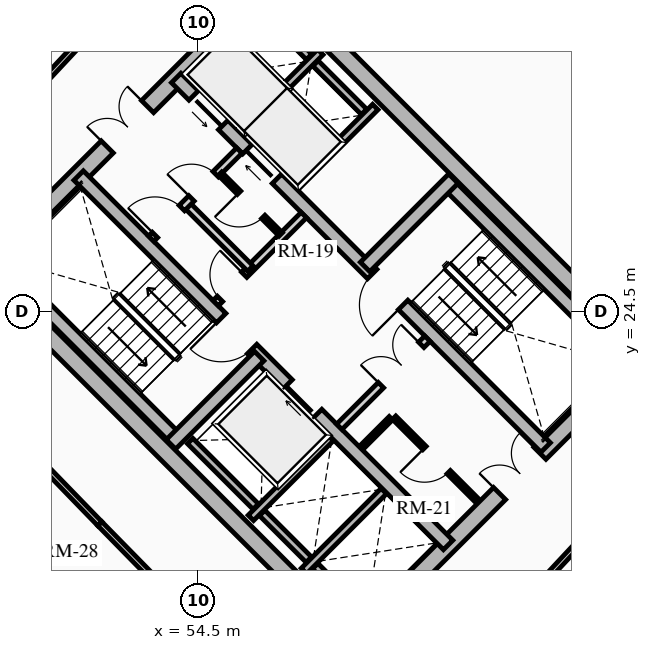
"""IFC4 building model, lengths in metres.
Left out: names, types, materials, properties, quantities, classifications, styles, units other than length and angle.
Written with IfcOpenShell. Run it as: python <this file> out.ifc"""

import sys

from ifc_helpers import new_model, si_unit, direction, frame, frame_2d, origin, place, context, subcontext, project, spatial, rectangle, extrude, source, transform, mapped, element, fill, save


model = new_model("IFC4")
c1 = context("Model", 3, precision=1e-05, world=origin(), true_north=direction((0.0, 1.0)))
c2 = subcontext(c1, "Body", "Model", "MODEL_VIEW")
j1 = project(units=[si_unit("LENGTHUNIT", "METRE"), si_unit("PLANEANGLEUNIT", "RADIAN")], contexts=[c1])
p1 = place(None, origin())
s1 = spatial("IfcSite", under=j1, at=p1, CompositionType="ELEMENT")
p2 = place(p1, origin())
s2 = spatial("IfcBuilding", under=s1, at=p2, CompositionType="ELEMENT")
p3 = place(p2, frame((0.0, 0.0, 119.62)))
s3 = spatial("IfcBuildingStorey", under=s2, at=p3, CompositionType="ELEMENT", Elevation=119.62)
for number, where, z_axis, x_axis in (
    (1, (58.737, 15.697, 0.0), (0.0, 0.0, 1.0), (-0.707, 0.707, 0.0)),
    (2, (66.303, 23.263, 0.0), (0.0, 0.0, 1.0), (-0.707, 0.707, 0.0)),
):
    element("IfcWall", number, at=place(p3, frame(where, z_axis=z_axis, x_axis=x_axis)), inside=s3, PredefinedType="SHEAR", context=c2, shape_type="SweptSolid", body=[
        extrude(rectangle(XDim=14.2, YDim=0.45, at=frame_2d((7.1, 0.0))), origin(), (0.0, 0.0, 1.0), 2.91),
    ])
p4 = place(p3, frame((58.578, 15.856, 0.0), z_axis=(0.0, 0.0, 1.0), x_axis=(0.707106781187, 0.707106781187, 0.0)))
e3 = element("IfcWall", 3, at=p4, inside=s3, PredefinedType="SHEAR", context=c2, shape_type="SweptSolid", body=[
    extrude(rectangle(XDim=10.7, YDim=0.45, at=frame_2d((5.35, 0.0))), origin(), (0.0, 0.0, 1.0), 2.91),
])
m1 = source(origin(), c2, "Body", "SweptSolid", [
    extrude(rectangle(XDim=1.5, YDim=2.02, at=frame_2d((0.75, 1.01))), frame((0.0, 0.235, 0.0), z_axis=(0.0, -1.0, 0.0), x_axis=(1.0, 0.0, 0.0)), (0.0, 0.0, 1.0), 0.47),
])
p5 = place(p4, frame((5.45, 0.0, 0.0)))
e4 = element("IfcOpeningElement", 4, at=p5, cuts=e3, PredefinedType="OPENING", context=c2, shape_type="MappedRepresentation", body=[
    mapped(m1, transform((0.0, 0.0, 0.0), x_axis=(1.0, 0.0, 0.0), y_axis=(0.0, 1.0, 0.0), z_axis=(0.0, 0.0, 1.0), scale=1.0)),
])
p6 = place(p3, frame((48.856, 25.578, 0.0), z_axis=(0.0, 0.0, 1.0), x_axis=(0.707106781187, 0.707106781187, 0.0)))
e5 = element("IfcWall", 5, at=p6, inside=s3, PredefinedType="SHEAR", context=c2, shape_type="SweptSolid", body=[
    extrude(rectangle(XDim=10.7, YDim=0.45, at=frame_2d((5.35, 0.0))), origin(), (0.0, 0.0, 1.0), 2.91),
])
p7 = place(p6, frame((4.6, 0.0, 0.0)))
e6 = element("IfcOpeningElement", 6, at=p7, cuts=e5, PredefinedType="OPENING", context=c2, shape_type="MappedRepresentation", body=[
    mapped(m1, transform((0.0, 0.0, 0.0), x_axis=(1.0, 0.0, 0.0), y_axis=(0.0, 1.0, 0.0), z_axis=(0.0, 0.0, 1.0), scale=1.0)),
])
p8 = place(p3, frame((61.078, 18.355, 0.0), z_axis=(0.0, 0.0, 1.0), x_axis=(-0.707106781187, 0.707106781187, 0.0)))
e7 = element("IfcWall", 7, at=p8, inside=s3, PredefinedType="SHEAR", context=c2, shape_type="SweptSolid", body=[
    extrude(rectangle(XDim=13.75, YDim=0.35, at=frame_2d((6.875, 0.0))), origin(), (0.0, 0.0, 1.0), 2.91),
])
m2 = source(origin(), c2, "Body", "SweptSolid", [
    extrude(rectangle(XDim=1.1, YDim=2.015, at=frame_2d((0.55, 1.007))), frame((0.0, 0.185, 0.0), z_axis=(0.0, -1.0, 0.0), x_axis=(1.0, 0.0, 0.0)), (0.0, 0.0, 1.0), 0.37),
])
p9 = place(p8, frame((4.875, 0.0, 0.0)))
e8 = element("IfcOpeningElement", 8, at=p9, cuts=e7, PredefinedType="OPENING", context=c2, shape_type="MappedRepresentation", body=[
    mapped(m2, transform((0.0, 0.0, 0.0), x_axis=(1.0, 0.0, 0.0), y_axis=(0.0, 1.0, 0.0), z_axis=(0.0, 0.0, 1.0), scale=1.0)),
])
m3 = source(origin(), c2, "Body", "SweptSolid", [
    extrude(rectangle(XDim=1.15, YDim=2.02, at=frame_2d((0.575, 1.01))), frame((0.0, 0.185, 0.0), z_axis=(0.0, -1.0, 0.0), x_axis=(1.0, 0.0, 0.0)), (0.0, 0.0, 1.0), 0.37),
])
p10 = place(p8, frame((7.295, 0.0, 0.0)))
e9 = element("IfcOpeningElement", 9, at=p10, cuts=e7, PredefinedType="OPENING", context=c2, shape_type="MappedRepresentation", body=[
    mapped(m3, transform((0.0, 0.0, 0.0), x_axis=(1.0, 0.0, 0.0), y_axis=(0.0, 1.0, 0.0), z_axis=(0.0, 0.0, 1.0), scale=1.0)),
])
p11 = place(p3, frame((63.645, 20.922, 0.0), z_axis=(0.0, 0.0, 1.0), x_axis=(-0.707106781187, 0.707106781187, 0.0)))
e10 = element("IfcWall", 10, at=p11, inside=s3, PredefinedType="SHEAR", context=c2, shape_type="SweptSolid", body=[
    extrude(rectangle(XDim=13.75, YDim=0.35, at=frame_2d((6.875, 0.0))), origin(), (0.0, 0.0, 1.0), 2.91),
])
p12 = place(p11, frame((10.0, 0.0, 0.0)))
e11 = element("IfcOpeningElement", 11, at=p12, cuts=e10, PredefinedType="OPENING", context=c2, shape_type="MappedRepresentation", body=[
    mapped(m2, transform((0.0, 0.0, 0.0), x_axis=(1.0, 0.0, 0.0), y_axis=(0.0, 1.0, 0.0), z_axis=(0.0, 0.0, 1.0), scale=1.0)),
])
p13 = place(p11, frame((12.0, 0.0, 0.0)))
e12 = element("IfcOpeningElement", 12, at=p13, cuts=e10, PredefinedType="OPENING", context=c2, shape_type="MappedRepresentation", body=[
    mapped(m2, transform((0.0, 0.0, 0.0), x_axis=(1.0, 0.0, 0.0), y_axis=(0.0, 1.0, 0.0), z_axis=(0.0, 0.0, 1.0), scale=1.0)),
])
p14 = place(p11, frame((5.305, 0.0, 0.0)))
e13 = element("IfcOpeningElement", 13, at=p14, cuts=e10, PredefinedType="OPENING", context=c2, shape_type="MappedRepresentation", body=[
    mapped(m3, transform((0.0, 0.0, 0.0), x_axis=(1.0, 0.0, 0.0), y_axis=(0.0, 1.0, 0.0), z_axis=(0.0, 0.0, 1.0), scale=1.0)),
])
p15 = place(p3, frame((53.922, 21.141, 0.0), z_axis=(0.0, 0.0, 1.0), x_axis=(-0.707088616009, 0.707124945897, 0.0)))
e14 = element("IfcWall", 14, at=p15, inside=s3, PredefinedType="SHEAR", context=c2, shape_type="SweptSolid", body=[
    extrude(rectangle(XDim=6.72, YDim=0.35, at=frame_2d((3.36, 0.0))), origin(), (0.0, 0.0, 1.0), 2.91),
])
p16 = place(p3, frame((53.784, 21.003, 0.0), z_axis=(0.0, 0.0, 1.0), x_axis=(0.707106781187, 0.707106781187, 0.0)))
e15 = element("IfcWall", 15, at=p16, inside=s3, PredefinedType="SHEAR", context=c2, shape_type="SweptSolid", body=[
    extrude(rectangle(XDim=3.285, YDim=0.35, at=frame_2d((1.643, 0.0))), origin(), (0.0, 0.0, 1.0), 2.91),
])
p17 = place(p3, frame((65.83, 23.107, 0.0), z_axis=(0.0, 0.0, 1.0), x_axis=(-0.707088616009, 0.707124945897, 0.0)))
e16 = element("IfcWall", 16, at=p17, inside=s3, PredefinedType="SHEAR", context=c2, shape_type="SweptSolid", body=[
    extrude(rectangle(XDim=6.72, YDim=0.35, at=frame_2d((3.36, 0.0))), origin(), (0.0, 0.0, 1.0), 2.91),
])
p18 = place(p3, frame((58.893, 25.674, 0.0), z_axis=(0.0, 0.0, 1.0), x_axis=(0.707106781187, 0.707106781187, 0.0)))
e17 = element("IfcWall", 17, at=p18, inside=s3, PredefinedType="SHEAR", context=c2, shape_type="SweptSolid", body=[
    extrude(rectangle(XDim=3.285, YDim=0.35, at=frame_2d((1.643, 0.0))), origin(), (0.0, 0.0, 1.0), 2.91),
])
p19 = place(p3, frame((55.888, 19.069, 0.0), z_axis=(0.0, 0.0, 1.0), x_axis=(0.707106781187, 0.707106781187, 0.0)))
e18 = element("IfcWall", 18, at=p19, inside=s3, PredefinedType="SHEAR", context=c2, shape_type="SweptSolid", body=[
    extrude(rectangle(XDim=2.97, YDim=0.2, at=frame_2d((1.485, 0.0))), origin(), (0.0, 0.0, 1.0), 2.91),
])
p20 = place(p3, frame((56.015, 19.366, 0.0), z_axis=(0.0, 0.0, 1.0), x_axis=(-0.707106781187, 0.707106781187, 0.0)))
e19 = element("IfcWall", 19, at=p20, inside=s3, PredefinedType="SHEAR", context=c2, shape_type="SweptSolid", body=[
    extrude(rectangle(XDim=2.44, YDim=0.2, at=frame_2d((1.22, 0.0))), origin(), (0.0, 0.0, 1.0), 2.91),
])
p21 = place(p3, frame((57.284, 17.673, 0.0), z_axis=(0.0, 0.0, 1.0), x_axis=(0.707147878904, 0.70706568108, 0.0)))
e20 = element("IfcWall", 20, at=p21, inside=s3, PredefinedType="SHEAR", context=c2, shape_type="SweptSolid", body=[
    extrude(rectangle(XDim=2.97, YDim=0.2, at=frame_2d((1.485, 0.0))), origin(), (0.0, 0.0, 1.0), 2.91),
])
p22 = place(p3, frame((57.412, 17.97, 0.0), z_axis=(0.0, 0.0, 1.0), x_axis=(-0.707106781187, 0.707106781187, 0.0)))
e21 = element("IfcWall", 21, at=p22, inside=s3, PredefinedType="SHEAR", context=c2, shape_type="SweptSolid", body=[
    extrude(rectangle(XDim=1.735, YDim=0.2, at=frame_2d((0.867, 0.0))), origin(), (0.0, 0.0, 1.0), 2.91),
])
p23 = place(p3, frame((58.737, 16.644, 0.0), z_axis=(0.0, 0.0, 1.0), x_axis=(-0.707032117043, 0.707181437447, 0.0)))
e22 = element("IfcWall", 22, at=p23, inside=s3, PredefinedType="SHEAR", context=c2, shape_type="SweptSolid", body=[
    extrude(rectangle(XDim=1.635, YDim=0.2, at=frame_2d((0.817, 0.0))), origin(), (0.0, 0.0, 1.0), 2.91),
])
p24 = place(p3, frame((57.062, 27.781, 0.0), z_axis=(0.0, 0.0, 1.0), x_axis=(0.707106781187, 0.707106781187, 0.0)))
e23 = element("IfcWall", 23, at=p24, inside=s3, PredefinedType="SHEAR", context=c2, shape_type="SweptSolid", body=[
    extrude(rectangle(XDim=2.97, YDim=0.2, at=frame_2d((1.485, 0.0))), origin(), (0.0, 0.0, 1.0), 2.91),
])
p25 = place(p3, frame((55.615, 29.227, 0.0), z_axis=(0.0, 0.0, 1.0), x_axis=(0.707147878904, 0.70706568108, 0.0)))
e24 = element("IfcWall", 24, at=p25, inside=s3, PredefinedType="SHEAR", context=c2, shape_type="SweptSolid", body=[
    extrude(rectangle(XDim=2.97, YDim=0.2, at=frame_2d((1.485, 0.0))), origin(), (0.0, 0.0, 1.0), 2.91),
])
p26 = place(p3, frame((58.865, 29.754, 0.0), z_axis=(0.0, 0.0, 1.0), x_axis=(-0.707174411312, 0.707039144592, 0.0)))
e25 = element("IfcWall", 25, at=p26, inside=s3, PredefinedType="SHEAR", context=c2, shape_type="SweptSolid", body=[
    extrude(rectangle(XDim=1.805, YDim=0.2, at=frame_2d((0.902, 0.0))), origin(), (0.0, 0.0, 1.0), 2.91),
])
p27 = place(p3, frame((57.419, 31.2, 0.0), z_axis=(0.0, 0.0, 1.0), x_axis=(-0.707032117043, 0.707181437447, 0.0)))
e26 = element("IfcWall", 26, at=p27, inside=s3, PredefinedType="SHEAR", context=c2, shape_type="SweptSolid", body=[
    extrude(rectangle(XDim=1.635, YDim=0.2, at=frame_2d((0.817, 0.0))), origin(), (0.0, 0.0, 1.0), 2.91),
])
p28 = place(p3, frame((58.214, 21.467, 0.0), z_axis=(0.0, 0.0, 1.0), x_axis=(0.707106781187, 0.707106781187, 0.0)))
e27 = element("IfcWall", 27, at=p28, inside=s3, PredefinedType="PARTITIONING", context=c2, shape_type="SweptSolid", body=[
    extrude(rectangle(XDim=3.28, YDim=0.2, at=frame_2d((1.64, 0.0))), origin(), (0.0, 0.0, 1.0), 2.655),
])
m4 = source(origin(), c2, "Body", "SweptSolid", [
    extrude(rectangle(XDim=1.5, YDim=2.02, at=frame_2d((0.75, 1.01))), frame((0.0, 0.11, 0.0), z_axis=(0.0, -1.0, 0.0), x_axis=(1.0, 0.0, 0.0)), (0.0, 0.0, 1.0), 0.22),
])
p29 = place(p28, frame((1.55, 0.0, 0.0)))
e28 = element("IfcOpeningElement", 28, at=p29, cuts=e27, PredefinedType="OPENING", context=c2, shape_type="MappedRepresentation", body=[
    mapped(m4, transform((0.0, 0.0, 0.0), x_axis=(1.0, 0.0, 0.0), y_axis=(0.0, 1.0, 0.0), z_axis=(0.0, 0.0, 1.0), scale=1.0)),
])
p30 = place(p3, frame((54.961, 24.719, 0.0), z_axis=(0.0, 0.0, 1.0), x_axis=(0.707106781187, 0.707106781187, 0.0)))
e29 = element("IfcWall", 29, at=p30, inside=s3, PredefinedType="PARTITIONING", context=c2, shape_type="SweptSolid", body=[
    extrude(rectangle(XDim=3.28, YDim=0.2, at=frame_2d((1.64, 0.0))), origin(), (0.0, 0.0, 1.0), 2.655),
])
m5 = source(origin(), c2, "Body", "SweptSolid", [
    extrude(rectangle(XDim=0.9, YDim=2.005, at=frame_2d((0.45, 1.002))), frame((0.0, 0.11, 0.0), z_axis=(0.0, -1.0, 0.0), x_axis=(1.0, 0.0, 0.0)), (0.0, 0.0, 1.0), 0.22),
])
p31 = place(p30, frame((0.16, 0.0, 0.0)))
e30 = element("IfcOpeningElement", 30, at=p31, cuts=e29, PredefinedType="OPENING", context=c2, shape_type="MappedRepresentation", body=[
    mapped(m5, transform((0.0, 0.0, 0.0), x_axis=(1.0, 0.0, 0.0), y_axis=(0.0, 1.0, 0.0), z_axis=(0.0, 0.0, 1.0), scale=1.0)),
])
p32 = place(p3, frame((55.874, 25.631, 0.0), z_axis=(0.0, 0.0, 1.0), x_axis=(-0.707157639372, 0.707055919343, 0.0)))
e31 = element("IfcWall", 31, at=p32, inside=s3, PredefinedType="PARTITIONING", context=c2, shape_type="SweptSolid", body=[
    extrude(rectangle(XDim=2.4, YDim=0.2, at=frame_2d((1.2, 0.0))), origin(), (0.0, 0.0, 1.0), 2.655),
])
p33 = place(p3, frame((53.264, 26.416, 0.0), z_axis=(0.0, 0.0, 1.0), x_axis=(0.707106781187, 0.707106781187, 0.0)))
e32 = element("IfcWall", 32, at=p33, inside=s3, PredefinedType="PARTITIONING", context=c2, shape_type="SweptSolid", body=[
    extrude(rectangle(XDim=3.28, YDim=0.2, at=frame_2d((1.64, 0.0))), origin(), (0.0, 0.0, 1.0), 2.655),
])
m6 = source(origin(), c2, "Body", "SweptSolid", [
    extrude(rectangle(XDim=1.0, YDim=2.015, at=frame_2d((0.5, 1.007))), frame((0.0, 0.11, 0.0), z_axis=(0.0, -1.0, 0.0), x_axis=(1.0, 0.0, 0.0)), (0.0, 0.0, 1.0), 0.22),
])
p34 = place(p33, frame((0.14, 0.0, 0.0)))
e33 = element("IfcOpeningElement", 33, at=p34, cuts=e32, PredefinedType="OPENING", context=c2, shape_type="MappedRepresentation", body=[
    mapped(m6, transform((0.0, 0.0, 0.0), x_axis=(1.0, 0.0, 0.0), y_axis=(0.0, 1.0, 0.0), z_axis=(0.0, 0.0, 1.0), scale=1.0)),
])
p35 = place(p33, frame((1.5, 0.0, 0.0)))
e34 = element("IfcOpeningElement", 34, at=p35, cuts=e32, PredefinedType="OPENING", context=c2, shape_type="MappedRepresentation", body=[
    mapped(m5, transform((0.0, 0.0, 0.0), x_axis=(1.0, 0.0, 0.0), y_axis=(0.0, 1.0, 0.0), z_axis=(0.0, 0.0, 1.0), scale=1.0)),
])
p36 = place(p3, frame((61.835, 19.529, 0.0), z_axis=(0.0, 0.0, 1.0), x_axis=(-0.707146413884, 0.707067146267, 0.0)))
e35 = element("IfcWall", 35, at=p36, inside=s3, PredefinedType="PARTITIONING", context=c2, shape_type="SweptSolid", body=[
    extrude(rectangle(XDim=3.08, YDim=0.125, at=frame_2d((1.54, 0.0))), origin(), (0.0, 0.0, 1.0), 2.655),
])
m7 = source(origin(), c2, "Body", "SweptSolid", [
    extrude(rectangle(XDim=0.9, YDim=2.005, at=frame_2d((0.45, 1.002))), frame((0.0, 0.073, 0.0), z_axis=(0.0, -1.0, 0.0), x_axis=(1.0, 0.0, 0.0)), (0.0, 0.0, 1.0), 0.145),
])
p37 = place(p36, frame((1.05, 0.0, 0.0)))
e36 = element("IfcOpeningElement", 36, at=p37, cuts=e35, PredefinedType="OPENING", context=c2, shape_type="MappedRepresentation", body=[
    mapped(m7, transform((0.0, 0.0, 0.0), x_axis=(1.0, 0.0, 0.0), y_axis=(0.0, 1.0, 0.0), z_axis=(0.0, 0.0, 1.0), scale=1.0)),
])
p38 = place(p3, frame((58.794, 20.915, 0.0), z_axis=(0.0, 0.0, 1.0), x_axis=(0.707106781187, 0.707106781187, 0.0)))
e37 = element("IfcWall", 37, at=p38, inside=s3, PredefinedType="PARTITIONING", context=c2, shape_type="SweptSolid", body=[
    extrude(rectangle(XDim=1.1, YDim=0.125, at=frame_2d((0.55, 0.0))), origin(), (0.0, 0.0, 1.0), 2.655),
])
p39 = place(p3, frame((56.673, 26.529, 0.0), z_axis=(0.0, 0.0, 1.0), x_axis=(-0.707052764397, 0.70716079385, 0.0)))
e38 = element("IfcWall", 38, at=p39, inside=s3, PredefinedType="PARTITIONING", context=c2, shape_type="SweptSolid", body=[
    extrude(rectangle(XDim=2.26, YDim=0.125, at=frame_2d((1.13, 0.0))), origin(), (0.0, 0.0, 1.0), 2.655),
])
p40 = place(p39, frame((0.65, 0.0, 0.0)))
e39 = element("IfcOpeningElement", 39, at=p40, cuts=e38, PredefinedType="OPENING", context=c2, shape_type="MappedRepresentation", body=[
    mapped(m7, transform((0.0, 0.0, 0.0), x_axis=(1.0, 0.0, 0.0), y_axis=(0.0, 1.0, 0.0), z_axis=(0.0, 0.0, 1.0), scale=1.0)),
])
p41 = place(p3, frame((52.043, 32.28, 0.0), z_axis=(0.0, 0.0, 1.0), x_axis=(-0.682606081633, -0.730786519661, 0.0)))
e40 = element("IfcWall", 40, at=p41, inside=s3, PredefinedType="PARTITIONING", context=c2, shape_type="SweptSolid", body=[
    extrude(rectangle(XDim=6.527, YDim=0.15, at=frame_2d((3.263, 0.0))), origin(), (0.0, 0.0, 1.0), 2.225),
])
p42 = place(p3, frame((47.706, 23.253, 0.0), z_axis=(0.0, 0.0, 1.0), x_axis=(0.696179266346, -0.717867974707, 0.0)))
e41 = element("IfcWall", 41, at=p42, inside=s3, PredefinedType="PARTITIONING", context=c2, shape_type="SweptSolid", body=[
    extrude(rectangle(XDim=6.045, YDim=0.15, at=frame_2d((3.022, 0.0))), origin(), (0.0, 0.0, 1.0), 2.655),
])
m8 = source(origin(), c2, "Body", "SweptSolid", [
    extrude(rectangle(XDim=1.05, YDim=2.015, at=frame_2d((0.525, 1.007))), frame((0.0, 0.085, 0.0), z_axis=(0.0, -1.0, 0.0), x_axis=(1.0, 0.0, 0.0)), (0.0, 0.0, 1.0), 0.17),
])
p43 = place(p42, frame((2.497, 0.0, 0.0)))
e42 = element("IfcOpeningElement", 42, at=p43, cuts=e41, PredefinedType="OPENING", context=c2, shape_type="MappedRepresentation", body=[
    mapped(m8, transform((0.0, 0.0, 0.0), x_axis=(1.0, 0.0, 0.0), y_axis=(0.0, 1.0, 0.0), z_axis=(0.0, 0.0, 1.0), scale=1.0)),
])
p44 = place(p3, frame((51.914, 18.914, 0.0), z_axis=(0.0, 0.0, 1.0), x_axis=(0.699999313799, -0.714143515465, 0.0)))
e43 = element("IfcWall", 43, at=p44, inside=s3, PredefinedType="PARTITIONING", context=c2, shape_type="SweptSolid", body=[
    extrude(rectangle(XDim=6.162, YDim=0.15, at=frame_2d((3.081, 0.0))), origin(), (0.0, 0.0, 1.0), 2.225),
])
p45 = place(p3, frame((62.903, 16.667, 0.0), z_axis=(0.0, 0.0, 1.0), x_axis=(0.682371947497, 0.731005147225, 0.0)))
e44 = element("IfcWall", 44, at=p45, inside=s3, PredefinedType="PARTITIONING", context=c2, shape_type="SweptSolid", body=[
    extrude(rectangle(XDim=6.642, YDim=0.15, at=frame_2d((3.321, 0.0))), origin(), (0.0, 0.0, 1.0), 2.225),
])
m9 = source(origin(), c2, "Body", "SweptSolid", [
    extrude(rectangle(XDim=1.1, YDim=2.015, at=frame_2d((0.55, 1.007))), frame((0.0, 0.025, 0.0), z_axis=(0.0, -1.0, 0.0), x_axis=(1.0, 0.0, 0.0)), (0.0, 0.0, 1.0), 0.05),
])
p46 = place(p9, origin())
e45 = element("IfcDoor", 45, at=p46, inside=s3, OperationType="SLIDING_TO_RIGHT", PredefinedType="DOOR", context=c2, shape_type="MappedRepresentation", body=[
    mapped(m9, transform((0.0, 0.0, 0.0), x_axis=(1.0, 0.0, 0.0), y_axis=(0.0, 1.0, 0.0), z_axis=(0.0, 0.0, 1.0), scale=1.0)),
])
fill(e8, e45)
p47 = place(p12, origin())
e46 = element("IfcDoor", 46, at=p47, inside=s3, OperationType="SLIDING_TO_RIGHT", PredefinedType="DOOR", context=c2, shape_type="MappedRepresentation", body=[
    mapped(m9, transform((0.0, 0.0, 0.0), x_axis=(1.0, 0.0, 0.0), y_axis=(0.0, 1.0, 0.0), z_axis=(0.0, 0.0, 1.0), scale=1.0)),
])
fill(e11, e46)
p48 = place(p13, origin())
e47 = element("IfcDoor", 47, at=p48, inside=s3, OperationType="SLIDING_TO_LEFT", PredefinedType="DOOR", context=c2, shape_type="MappedRepresentation", body=[
    mapped(m9, transform((0.0, 0.0, 0.0), x_axis=(1.0, 0.0, 0.0), y_axis=(0.0, 1.0, 0.0), z_axis=(0.0, 0.0, 1.0), scale=1.0)),
])
fill(e12, e47)
m10 = source(origin(), c2, "Body", "SweptSolid", [
    extrude(rectangle(XDim=1.15, YDim=2.02, at=frame_2d((0.575, 1.01))), frame((0.0, 0.025, 0.0), z_axis=(0.0, -1.0, 0.0), x_axis=(1.0, 0.0, 0.0)), (0.0, 0.0, 1.0), 0.05),
])
p49 = place(p10, origin())
e48 = element("IfcDoor", 48, at=p49, inside=s3, OperationType="SINGLE_SWING_RIGHT", PredefinedType="DOOR", context=c2, shape_type="MappedRepresentation", body=[
    mapped(m10, transform((0.0, 0.0, 0.0), x_axis=(1.0, 0.0, 0.0), y_axis=(0.0, 1.0, 0.0), z_axis=(0.0, 0.0, 1.0), scale=1.0)),
])
fill(e9, e48)
p50 = place(p14, origin())
e49 = element("IfcDoor", 49, at=p50, inside=s3, OperationType="SINGLE_SWING_LEFT", PredefinedType="DOOR", context=c2, shape_type="MappedRepresentation", body=[
    mapped(m10, transform((0.0, 0.0, 0.0), x_axis=(1.0, 0.0, 0.0), y_axis=(0.0, 1.0, 0.0), z_axis=(0.0, 0.0, 1.0), scale=1.0)),
])
fill(e13, e49)
m11 = source(origin(), c2, "Body", "SweptSolid", [
    extrude(rectangle(XDim=1.5, YDim=2.02, at=frame_2d((0.75, 1.01))), frame((0.0, 0.025, 0.0), z_axis=(0.0, -1.0, 0.0), x_axis=(1.0, 0.0, 0.0)), (0.0, 0.0, 1.0), 0.05),
])
p51 = place(p7, origin())
e50 = element("IfcDoor", 50, at=p51, inside=s3, OperationType="DOUBLE_DOOR_SINGLE_SWING", PredefinedType="DOOR", context=c2, shape_type="MappedRepresentation", body=[
    mapped(m11, transform((0.0, 0.0, 0.0), x_axis=(1.0, 0.0, 0.0), y_axis=(0.0, 1.0, 0.0), z_axis=(0.0, 0.0, 1.0), scale=1.0)),
])
fill(e6, e50)
p52 = place(p5, origin())
e51 = element("IfcDoor", 51, at=p52, inside=s3, OperationType="DOUBLE_DOOR_SINGLE_SWING", PredefinedType="DOOR", context=c2, shape_type="MappedRepresentation", body=[
    mapped(m11, transform((0.0, 0.0, 0.0), x_axis=(1.0, 0.0, 0.0), y_axis=(0.0, 1.0, 0.0), z_axis=(0.0, 0.0, 1.0), scale=1.0)),
])
fill(e4, e51)
p53 = place(p29, origin())
e52 = element("IfcDoor", 52, at=p53, inside=s3, OperationType="DOUBLE_DOOR_SINGLE_SWING", PredefinedType="DOOR", context=c2, shape_type="MappedRepresentation", body=[
    mapped(m11, transform((0.0, 0.0, 0.0), x_axis=(1.0, 0.0, 0.0), y_axis=(0.0, 1.0, 0.0), z_axis=(0.0, 0.0, 1.0), scale=1.0)),
])
fill(e28, e52)
m12 = source(origin(), c2, "Body", "SweptSolid", [
    extrude(rectangle(XDim=0.9, YDim=2.005, at=frame_2d((0.45, 1.002))), frame((0.0, 0.025, 0.0), z_axis=(0.0, -1.0, 0.0), x_axis=(1.0, 0.0, 0.0)), (0.0, 0.0, 1.0), 0.05),
])
p54 = place(p31, origin())
e53 = element("IfcDoor", 53, at=p54, inside=s3, OperationType="SINGLE_SWING_RIGHT", PredefinedType="DOOR", context=c2, shape_type="MappedRepresentation", body=[
    mapped(m12, transform((0.0, 0.0, 0.0), x_axis=(1.0, 0.0, 0.0), y_axis=(0.0, 1.0, 0.0), z_axis=(0.0, 0.0, 1.0), scale=1.0)),
])
fill(e30, e53)
m13 = source(origin(), c2, "Body", "SweptSolid", [
    extrude(rectangle(XDim=1.0, YDim=2.015, at=frame_2d((0.5, 1.007))), frame((0.0, 0.025, 0.0), z_axis=(0.0, -1.0, 0.0), x_axis=(1.0, 0.0, 0.0)), (0.0, 0.0, 1.0), 0.05),
])
p55 = place(p34, origin())
e54 = element("IfcDoor", 54, at=p55, inside=s3, OperationType="SINGLE_SWING_LEFT", PredefinedType="DOOR", context=c2, shape_type="MappedRepresentation", body=[
    mapped(m13, transform((0.0, 0.0, 0.0), x_axis=(1.0, 0.0, 0.0), y_axis=(0.0, 1.0, 0.0), z_axis=(0.0, 0.0, 1.0), scale=1.0)),
])
fill(e33, e54)
p56 = place(p37, origin())
e55 = element("IfcDoor", 55, at=p56, inside=s3, OperationType="SINGLE_SWING_RIGHT", PredefinedType="DOOR", context=c2, shape_type="MappedRepresentation", body=[
    mapped(m12, transform((0.0, 0.0, 0.0), x_axis=(1.0, 0.0, 0.0), y_axis=(0.0, 1.0, 0.0), z_axis=(0.0, 0.0, 1.0), scale=1.0)),
])
fill(e36, e55)
p57 = place(p35, origin())
e56 = element("IfcDoor", 56, at=p57, inside=s3, OperationType="SINGLE_SWING_LEFT", PredefinedType="DOOR", context=c2, shape_type="MappedRepresentation", body=[
    mapped(m12, transform((0.0, 0.0, 0.0), x_axis=(1.0, 0.0, 0.0), y_axis=(0.0, 1.0, 0.0), z_axis=(0.0, 0.0, 1.0), scale=1.0)),
])
fill(e34, e56)
p58 = place(p40, origin())
e57 = element("IfcDoor", 57, at=p58, inside=s3, OperationType="SINGLE_SWING_RIGHT", PredefinedType="DOOR", context=c2, shape_type="MappedRepresentation", body=[
    mapped(m12, transform((0.0, 0.0, 0.0), x_axis=(1.0, 0.0, 0.0), y_axis=(0.0, 1.0, 0.0), z_axis=(0.0, 0.0, 1.0), scale=1.0)),
])
fill(e39, e57)
save(model, sys.argv[1])
